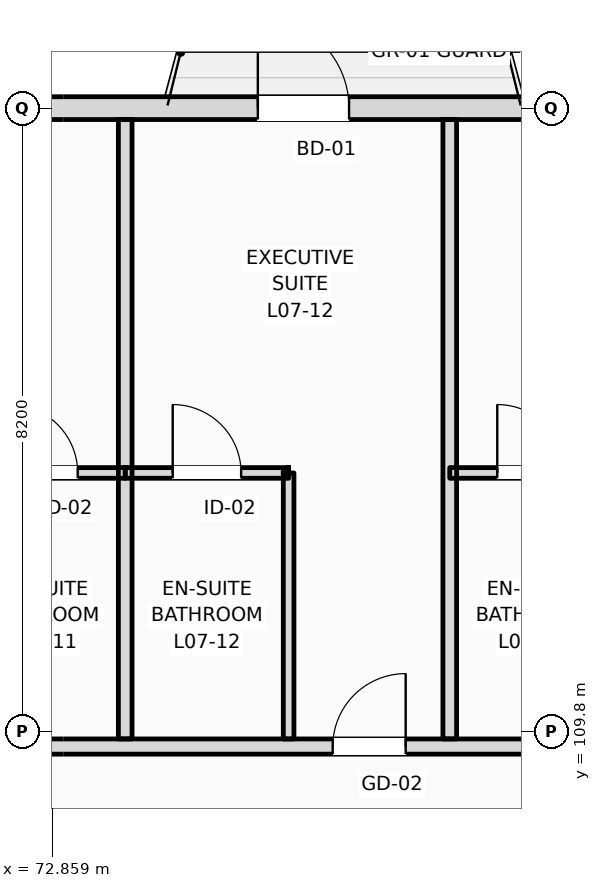
"""IFC4 building model, lengths in metres.
Left out: names, types, materials, properties, quantities, classifications, styles, units other than length and angle.
Written with IfcOpenShell. Run it as: python <this file> out.ifc"""

import sys

from ifc_helpers import new_model, si_unit, direction, frame, frame_2d, origin, place, context, subcontext, project, spatial, rectangle, extrude, element, fill, save


model = new_model("IFC4")
c1 = context("Model", 3, precision=1e-05, world=origin(), true_north=direction((0.0, 1.0)))
c2 = subcontext(c1, "Body", "Model", "MODEL_VIEW")
j1 = project(units=[si_unit("LENGTHUNIT", "METRE"), si_unit("PLANEANGLEUNIT", "RADIAN")], contexts=[c1])
p1 = place(None, origin())
s1 = spatial("IfcSite", under=j1, at=p1, CompositionType="ELEMENT")
p2 = place(p1, origin())
s2 = spatial("IfcBuilding", under=s1, at=p2, CompositionType="ELEMENT")
p3 = place(p2, frame((0.0, 0.0, 31.8)))
s3 = spatial("IfcBuildingStorey", under=s2, at=p3, CompositionType="ELEMENT", Elevation=31.8)
p4 = place(p3, frame((22.5, 118.0, 0.0), z_axis=(0.0, 0.0, 1.0), x_axis=(1.0, 0.0, 0.0)))
e1 = element("IfcWall", 1, at=p4, inside=s3, PredefinedType="STANDARD", context=c2, shape_type="SweptSolid", body=[
    extrude(rectangle(XDim=97.5, YDim=0.3, at=frame_2d((48.75, 0.0))), origin(), (0.0, 0.0, 1.0), 2.72),
])
p5 = place(p4, frame((3.61, 0.0, 0.9)))
e2 = element("IfcOpeningElement", 2, at=p5, cuts=e1, PredefinedType="OPENING", context=c2, shape_type="SweptSolid", body=[
    extrude(rectangle(XDim=1.1, YDim=1.64, at=frame_2d((0.55, 0.82))), frame((0.0, 0.16, 0.0), z_axis=(0.0, -1.0, 0.0), x_axis=(1.0, 0.0, 0.0)), (0.0, 0.0, 1.0), 0.32),
])
p6 = place(p4, frame((6.855, 0.0, 0.0)))
e3 = element("IfcOpeningElement", 3, at=p6, cuts=e1, PredefinedType="OPENING", context=c2, shape_type="SweptSolid", body=[
    extrude(rectangle(XDim=1.2, YDim=2.25, at=frame_2d((0.6, 1.125))), frame((0.0, 0.16, 0.0), z_axis=(0.0, -1.0, 0.0), x_axis=(1.0, 0.0, 0.0)), (0.0, 0.0, 1.0), 0.32),
])
p7 = place(p4, frame((11.405, 0.0, 0.9)))
e4 = element("IfcOpeningElement", 4, at=p7, cuts=e1, PredefinedType="OPENING", context=c2, shape_type="SweptSolid", body=[
    extrude(rectangle(XDim=2.1, YDim=1.64, at=frame_2d((1.05, 0.82))), frame((0.0, 0.16, 0.0), z_axis=(0.0, -1.0, 0.0), x_axis=(1.0, 0.0, 0.0)), (0.0, 0.0, 1.0), 0.32),
])
p8 = place(p4, frame((15.13, 0.0, 0.9)))
e5 = element("IfcOpeningElement", 5, at=p8, cuts=e1, PredefinedType="OPENING", context=c2, shape_type="SweptSolid", body=[
    extrude(rectangle(XDim=2.25, YDim=1.64, at=frame_2d((1.125, 0.82))), frame((0.0, 0.16, 0.0), z_axis=(0.0, -1.0, 0.0), x_axis=(1.0, 0.0, 0.0)), (0.0, 0.0, 1.0), 0.32),
])
p9 = place(p4, frame((21.53, 0.0, 0.0)))
e6 = element("IfcOpeningElement", 6, at=p9, cuts=e1, PredefinedType="OPENING", context=c2, shape_type="SweptSolid", body=[
    extrude(rectangle(XDim=1.2, YDim=2.25, at=frame_2d((0.6, 1.125))), frame((0.0, 0.16, 0.0), z_axis=(0.0, -1.0, 0.0), x_axis=(1.0, 0.0, 0.0)), (0.0, 0.0, 1.0), 0.32),
])
p10 = place(p4, frame((24.18, 0.0, 0.9)))
e7 = element("IfcOpeningElement", 7, at=p10, cuts=e1, PredefinedType="OPENING", context=c2, shape_type="SweptSolid", body=[
    extrude(rectangle(XDim=1.1, YDim=1.64, at=frame_2d((0.55, 0.82))), frame((0.0, 0.16, 0.0), z_axis=(0.0, -1.0, 0.0), x_axis=(1.0, 0.0, 0.0)), (0.0, 0.0, 1.0), 0.32),
])
p11 = place(p4, frame((29.105, 0.0, 0.9)))
e8 = element("IfcOpeningElement", 8, at=p11, cuts=e1, PredefinedType="OPENING", context=c2, shape_type="SweptSolid", body=[
    extrude(rectangle(XDim=2.7, YDim=1.64, at=frame_2d((1.35, 0.82))), frame((0.0, 0.16, 0.0), z_axis=(0.0, -1.0, 0.0), x_axis=(1.0, 0.0, 0.0)), (0.0, 0.0, 1.0), 0.32),
])
p12 = place(p4, frame((34.83, 0.0, 0.9)))
e9 = element("IfcOpeningElement", 9, at=p12, cuts=e1, PredefinedType="OPENING", context=c2, shape_type="SweptSolid", body=[
    extrude(rectangle(XDim=1.8, YDim=1.64, at=frame_2d((0.9, 0.82))), frame((0.0, 0.16, 0.0), z_axis=(0.0, -1.0, 0.0), x_axis=(1.0, 0.0, 0.0)), (0.0, 0.0, 1.0), 0.32),
])
p13 = place(p4, frame((38.525, 0.0, 0.0)))
e10 = element("IfcOpeningElement", 10, at=p13, cuts=e1, PredefinedType="OPENING", context=c2, shape_type="SweptSolid", body=[
    extrude(rectangle(XDim=1.2, YDim=2.25, at=frame_2d((0.6, 1.125))), frame((0.0, 0.16, 0.0), z_axis=(0.0, -1.0, 0.0), x_axis=(1.0, 0.0, 0.0)), (0.0, 0.0, 1.0), 0.32),
])
p14 = place(p4, frame((42.73, 0.0, 0.9)))
e11 = element("IfcOpeningElement", 11, at=p14, cuts=e1, PredefinedType="OPENING", context=c2, shape_type="SweptSolid", body=[
    extrude(rectangle(XDim=3.05, YDim=1.64, at=frame_2d((1.525, 0.82))), frame((0.0, 0.16, 0.0), z_axis=(0.0, -1.0, 0.0), x_axis=(1.0, 0.0, 0.0)), (0.0, 0.0, 1.0), 0.32),
])
p15 = place(p4, frame((47.155, 0.0, 0.9)))
e12 = element("IfcOpeningElement", 12, at=p15, cuts=e1, PredefinedType="OPENING", context=c2, shape_type="SweptSolid", body=[
    extrude(rectangle(XDim=1.35, YDim=1.64, at=frame_2d((0.675, 0.82))), frame((0.0, 0.16, 0.0), z_axis=(0.0, -1.0, 0.0), x_axis=(1.0, 0.0, 0.0)), (0.0, 0.0, 1.0), 0.32),
])
p16 = place(p4, frame((53.065, 0.0, 0.0)))
e13 = element("IfcOpeningElement", 13, at=p16, cuts=e1, PredefinedType="OPENING", context=c2, shape_type="SweptSolid", body=[
    extrude(rectangle(XDim=1.2, YDim=2.25, at=frame_2d((0.6, 1.125))), frame((0.0, 0.16, 0.0), z_axis=(0.0, -1.0, 0.0), x_axis=(1.0, 0.0, 0.0)), (0.0, 0.0, 1.0), 0.32),
])
p17 = place(p4, frame((58.2, 0.0, 0.9)))
e14 = element("IfcOpeningElement", 14, at=p17, cuts=e1, PredefinedType="OPENING", context=c2, shape_type="SweptSolid", body=[
    extrude(rectangle(XDim=1.8, YDim=1.64, at=frame_2d((0.9, 0.82))), frame((0.0, 0.16, 0.0), z_axis=(0.0, -1.0, 0.0), x_axis=(1.0, 0.0, 0.0)), (0.0, 0.0, 1.0), 0.32),
])
p18 = place(p4, frame((61.13, 0.0, 0.9)))
e15 = element("IfcOpeningElement", 15, at=p18, cuts=e1, PredefinedType="OPENING", context=c2, shape_type="SweptSolid", body=[
    extrude(rectangle(XDim=3.05, YDim=1.64, at=frame_2d((1.525, 0.82))), frame((0.0, 0.16, 0.0), z_axis=(0.0, -1.0, 0.0), x_axis=(1.0, 0.0, 0.0)), (0.0, 0.0, 1.0), 0.32),
])
p19 = place(p4, frame((67.93, 0.0, 0.0)))
e16 = element("IfcOpeningElement", 16, at=p19, cuts=e1, PredefinedType="OPENING", context=c2, shape_type="SweptSolid", body=[
    extrude(rectangle(XDim=1.2, YDim=2.25, at=frame_2d((0.6, 1.125))), frame((0.0, 0.16, 0.0), z_axis=(0.0, -1.0, 0.0), x_axis=(1.0, 0.0, 0.0)), (0.0, 0.0, 1.0), 0.32),
])
p20 = place(p4, frame((70.39, 0.0, 0.0)))
e17 = element("IfcOpeningElement", 17, at=p20, cuts=e1, PredefinedType="OPENING", context=c2, shape_type="SweptSolid", body=[
    extrude(rectangle(XDim=1.2, YDim=2.25, at=frame_2d((0.6, 1.125))), frame((0.0, 0.16, 0.0), z_axis=(0.0, -1.0, 0.0), x_axis=(1.0, 0.0, 0.0)), (0.0, 0.0, 1.0), 0.32),
])
p21 = place(p4, frame((75.905, 0.0, 0.9)))
e18 = element("IfcOpeningElement", 18, at=p21, cuts=e1, PredefinedType="OPENING", context=c2, shape_type="SweptSolid", body=[
    extrude(rectangle(XDim=1.1, YDim=1.5, at=frame_2d((0.55, 0.75))), frame((0.0, 0.16, 0.0), z_axis=(0.0, -1.0, 0.0), x_axis=(1.0, 0.0, 0.0)), (0.0, 0.0, 1.0), 0.32),
])
p22 = place(p4, frame((81.63, 0.0, 0.9)))
e19 = element("IfcOpeningElement", 19, at=p22, cuts=e1, PredefinedType="OPENING", context=c2, shape_type="SweptSolid", body=[
    extrude(rectangle(XDim=1.1, YDim=1.6, at=frame_2d((0.55, 0.8))), frame((0.0, 0.16, 0.0), z_axis=(0.0, -1.0, 0.0), x_axis=(1.0, 0.0, 0.0)), (0.0, 0.0, 1.0), 0.32),
])
p23 = place(p4, frame((84.955, 0.0, 0.9)))
e20 = element("IfcOpeningElement", 20, at=p23, cuts=e1, PredefinedType="OPENING", context=c2, shape_type="SweptSolid", body=[
    extrude(rectangle(XDim=1.4, YDim=1.64, at=frame_2d((0.7, 0.82))), frame((0.0, 0.16, 0.0), z_axis=(0.0, -1.0, 0.0), x_axis=(1.0, 0.0, 0.0)), (0.0, 0.0, 1.0), 0.32),
])
p24 = place(p4, frame((90.055, 0.0, 0.9)))
e21 = element("IfcOpeningElement", 21, at=p24, cuts=e1, PredefinedType="OPENING", context=c2, shape_type="SweptSolid", body=[
    extrude(rectangle(XDim=1.6, YDim=1.64, at=frame_2d((0.8, 0.82))), frame((0.0, 0.16, 0.0), z_axis=(0.0, -1.0, 0.0), x_axis=(1.0, 0.0, 0.0)), (0.0, 0.0, 1.0), 0.32),
])
p25 = place(p4, frame((93.87, 0.0, 0.9)))
e22 = element("IfcOpeningElement", 22, at=p25, cuts=e1, PredefinedType="OPENING", context=c2, shape_type="SweptSolid", body=[
    extrude(rectangle(XDim=1.75, YDim=1.64, at=frame_2d((0.875, 0.82))), frame((0.0, 0.16, 0.0), z_axis=(0.0, -1.0, 0.0), x_axis=(1.0, 0.0, 0.0)), (0.0, 0.0, 1.0), 0.32),
])
p26 = place(p3, frame((10.65, 109.6, 0.0), z_axis=(0.0, 0.0, 1.0), x_axis=(1.0, 0.0, 0.0)))
e23 = element("IfcWall", 23, at=p26, inside=s3, PredefinedType="PARTITIONING", context=c2, shape_type="SweptSolid", body=[
    extrude(rectangle(XDim=109.21, YDim=0.2, at=frame_2d((54.605, 0.0))), origin(), (0.0, 0.0, 1.0), 2.72),
])
p27 = place(p26, frame((15.825, 0.0, 0.0)))
e24 = element("IfcOpeningElement", 24, at=p27, cuts=e23, PredefinedType="OPENING", context=c2, shape_type="SweptSolid", body=[
    extrude(rectangle(XDim=1.02, YDim=2.2, at=frame_2d((0.51, 1.1))), frame((0.0, 0.11, 0.0), z_axis=(0.0, -1.0, 0.0), x_axis=(1.0, 0.0, 0.0)), (0.0, 0.0, 1.0), 0.22),
])
p28 = place(p26, frame((19.87, 0.0, 0.0)))
e25 = element("IfcOpeningElement", 25, at=p28, cuts=e23, PredefinedType="OPENING", context=c2, shape_type="SweptSolid", body=[
    extrude(rectangle(XDim=1.02, YDim=2.2, at=frame_2d((0.51, 1.1))), frame((0.0, 0.11, 0.0), z_axis=(0.0, -1.0, 0.0), x_axis=(1.0, 0.0, 0.0)), (0.0, 0.0, 1.0), 0.22),
])
p29 = place(p26, frame((24.47, 0.0, 0.0)))
e26 = element("IfcOpeningElement", 26, at=p29, cuts=e23, PredefinedType="OPENING", context=c2, shape_type="SweptSolid", body=[
    extrude(rectangle(XDim=1.02, YDim=2.2, at=frame_2d((0.51, 1.1))), frame((0.0, 0.11, 0.0), z_axis=(0.0, -1.0, 0.0), x_axis=(1.0, 0.0, 0.0)), (0.0, 0.0, 1.0), 0.22),
])
p30 = place(p26, frame((26.92, 0.0, 0.0)))
e27 = element("IfcOpeningElement", 27, at=p30, cuts=e23, PredefinedType="OPENING", context=c2, shape_type="SweptSolid", body=[
    extrude(rectangle(XDim=1.02, YDim=2.2, at=frame_2d((0.51, 1.1))), frame((0.0, 0.11, 0.0), z_axis=(0.0, -1.0, 0.0), x_axis=(1.0, 0.0, 0.0)), (0.0, 0.0, 1.0), 0.22),
])
p31 = place(p26, frame((33.7, 0.0, 0.0)))
e28 = element("IfcOpeningElement", 28, at=p31, cuts=e23, PredefinedType="OPENING", context=c2, shape_type="SweptSolid", body=[
    extrude(rectangle(XDim=0.96, YDim=2.2, at=frame_2d((0.48, 1.1))), frame((0.0, 0.11, 0.0), z_axis=(0.0, -1.0, 0.0), x_axis=(1.0, 0.0, 0.0)), (0.0, 0.0, 1.0), 0.22),
])
p32 = place(p26, frame((35.9, 0.0, 0.0)))
e29 = element("IfcOpeningElement", 29, at=p32, cuts=e23, PredefinedType="OPENING", context=c2, shape_type="SweptSolid", body=[
    extrude(rectangle(XDim=0.96, YDim=2.2, at=frame_2d((0.48, 1.1))), frame((0.0, 0.11, 0.0), z_axis=(0.0, -1.0, 0.0), x_axis=(1.0, 0.0, 0.0)), (0.0, 0.0, 1.0), 0.22),
])
p33 = place(p26, frame((42.9, 0.0, 0.0)))
e30 = element("IfcOpeningElement", 30, at=p33, cuts=e23, PredefinedType="OPENING", context=c2, shape_type="SweptSolid", body=[
    extrude(rectangle(XDim=0.96, YDim=2.2, at=frame_2d((0.48, 1.1))), frame((0.0, 0.11, 0.0), z_axis=(0.0, -1.0, 0.0), x_axis=(1.0, 0.0, 0.0)), (0.0, 0.0, 1.0), 0.22),
])
p34 = place(p26, frame((47.5, 0.0, 0.0)))
e31 = element("IfcOpeningElement", 31, at=p34, cuts=e23, PredefinedType="OPENING", context=c2, shape_type="SweptSolid", body=[
    extrude(rectangle(XDim=0.96, YDim=2.2, at=frame_2d((0.48, 1.1))), frame((0.0, 0.11, 0.0), z_axis=(0.0, -1.0, 0.0), x_axis=(1.0, 0.0, 0.0)), (0.0, 0.0, 1.0), 0.22),
])
p35 = place(p26, frame((49.95, 0.0, 0.0)))
e32 = element("IfcOpeningElement", 32, at=p35, cuts=e23, PredefinedType="OPENING", context=c2, shape_type="SweptSolid", body=[
    extrude(rectangle(XDim=0.96, YDim=2.2, at=frame_2d((0.48, 1.1))), frame((0.0, 0.11, 0.0), z_axis=(0.0, -1.0, 0.0), x_axis=(1.0, 0.0, 0.0)), (0.0, 0.0, 1.0), 0.22),
])
p36 = place(p26, frame((56.7, 0.0, 0.0)))
e33 = element("IfcOpeningElement", 33, at=p36, cuts=e23, PredefinedType="OPENING", context=c2, shape_type="SweptSolid", body=[
    extrude(rectangle(XDim=0.96, YDim=2.2, at=frame_2d((0.48, 1.1))), frame((0.0, 0.11, 0.0), z_axis=(0.0, -1.0, 0.0), x_axis=(1.0, 0.0, 0.0)), (0.0, 0.0, 1.0), 0.22),
])
p37 = place(p26, frame((59.15, 0.0, 0.0)))
e34 = element("IfcOpeningElement", 34, at=p37, cuts=e23, PredefinedType="OPENING", context=c2, shape_type="SweptSolid", body=[
    extrude(rectangle(XDim=0.96, YDim=2.2, at=frame_2d((0.48, 1.1))), frame((0.0, 0.11, 0.0), z_axis=(0.0, -1.0, 0.0), x_axis=(1.0, 0.0, 0.0)), (0.0, 0.0, 1.0), 0.22),
])
p38 = place(p26, frame((65.9, 0.0, 0.0)))
e35 = element("IfcOpeningElement", 35, at=p38, cuts=e23, PredefinedType="OPENING", context=c2, shape_type="SweptSolid", body=[
    extrude(rectangle(XDim=0.96, YDim=2.2, at=frame_2d((0.48, 1.1))), frame((0.0, 0.11, 0.0), z_axis=(0.0, -1.0, 0.0), x_axis=(1.0, 0.0, 0.0)), (0.0, 0.0, 1.0), 0.22),
])
p39 = place(p26, frame((70.5, 0.0, 0.0)))
e36 = element("IfcOpeningElement", 36, at=p39, cuts=e23, PredefinedType="OPENING", context=c2, shape_type="SweptSolid", body=[
    extrude(rectangle(XDim=0.96, YDim=2.2, at=frame_2d((0.48, 1.1))), frame((0.0, 0.11, 0.0), z_axis=(0.0, -1.0, 0.0), x_axis=(1.0, 0.0, 0.0)), (0.0, 0.0, 1.0), 0.22),
])
p40 = place(p26, frame((72.95, 0.0, 0.0)))
e37 = element("IfcOpeningElement", 37, at=p40, cuts=e23, PredefinedType="OPENING", context=c2, shape_type="SweptSolid", body=[
    extrude(rectangle(XDim=0.96, YDim=2.2, at=frame_2d((0.48, 1.1))), frame((0.0, 0.11, 0.0), z_axis=(0.0, -1.0, 0.0), x_axis=(1.0, 0.0, 0.0)), (0.0, 0.0, 1.0), 0.22),
])
p41 = place(p26, frame((79.7, 0.0, 0.0)))
e38 = element("IfcOpeningElement", 38, at=p41, cuts=e23, PredefinedType="OPENING", context=c2, shape_type="SweptSolid", body=[
    extrude(rectangle(XDim=0.96, YDim=2.2, at=frame_2d((0.48, 1.1))), frame((0.0, 0.11, 0.0), z_axis=(0.0, -1.0, 0.0), x_axis=(1.0, 0.0, 0.0)), (0.0, 0.0, 1.0), 0.22),
])
p42 = place(p26, frame((82.15, 0.0, 0.0)))
e39 = element("IfcOpeningElement", 39, at=p42, cuts=e23, PredefinedType="OPENING", context=c2, shape_type="SweptSolid", body=[
    extrude(rectangle(XDim=0.96, YDim=2.2, at=frame_2d((0.48, 1.1))), frame((0.0, 0.11, 0.0), z_axis=(0.0, -1.0, 0.0), x_axis=(1.0, 0.0, 0.0)), (0.0, 0.0, 1.0), 0.22),
])
p43 = place(p26, frame((88.9, 0.0, 0.0)))
e40 = element("IfcOpeningElement", 40, at=p43, cuts=e23, PredefinedType="OPENING", context=c2, shape_type="SweptSolid", body=[
    extrude(rectangle(XDim=0.96, YDim=2.2, at=frame_2d((0.48, 1.1))), frame((0.0, 0.11, 0.0), z_axis=(0.0, -1.0, 0.0), x_axis=(1.0, 0.0, 0.0)), (0.0, 0.0, 1.0), 0.22),
])
p44 = place(p26, frame((93.75, 0.0, 0.0)))
e41 = element("IfcOpeningElement", 41, at=p44, cuts=e23, PredefinedType="OPENING", context=c2, shape_type="SweptSolid", body=[
    extrude(rectangle(XDim=0.96, YDim=2.2, at=frame_2d((0.48, 1.1))), frame((0.0, 0.11, 0.0), z_axis=(0.0, -1.0, 0.0), x_axis=(1.0, 0.0, 0.0)), (0.0, 0.0, 1.0), 0.22),
])
p45 = place(p26, frame((98.1, 0.0, 0.0)))
e42 = element("IfcOpeningElement", 42, at=p45, cuts=e23, PredefinedType="OPENING", context=c2, shape_type="SweptSolid", body=[
    extrude(rectangle(XDim=0.96, YDim=2.2, at=frame_2d((0.48, 1.1))), frame((0.0, 0.11, 0.0), z_axis=(0.0, -1.0, 0.0), x_axis=(1.0, 0.0, 0.0)), (0.0, 0.0, 1.0), 0.22),
])
p46 = place(p26, frame((102.7, 0.0, 0.0)))
e43 = element("IfcOpeningElement", 43, at=p46, cuts=e23, PredefinedType="OPENING", context=c2, shape_type="SweptSolid", body=[
    extrude(rectangle(XDim=0.96, YDim=2.2, at=frame_2d((0.48, 1.1))), frame((0.0, 0.11, 0.0), z_axis=(0.0, -1.0, 0.0), x_axis=(1.0, 0.0, 0.0)), (0.0, 0.0, 1.0), 0.22),
])
p47 = place(p26, frame((105.04, 0.0, 0.0)))
e44 = element("IfcOpeningElement", 44, at=p47, cuts=e23, PredefinedType="OPENING", context=c2, shape_type="SweptSolid", body=[
    extrude(rectangle(XDim=0.96, YDim=2.2, at=frame_2d((0.48, 1.1))), frame((0.0, 0.11, 0.0), z_axis=(0.0, -1.0, 0.0), x_axis=(1.0, 0.0, 0.0)), (0.0, 0.0, 1.0), 0.22),
])
p48 = place(p26, frame((2.716, 0.0, 0.0)))
e45 = element("IfcOpeningElement", 45, at=p48, cuts=e23, PredefinedType="OPENING", context=c2, shape_type="SweptSolid", body=[
    extrude(rectangle(XDim=1.35, YDim=2.25, at=frame_2d((0.675, 1.125))), frame((0.0, 0.11, 0.0), z_axis=(0.0, -1.0, 0.0), x_axis=(1.0, 0.0, 0.0)), (0.0, 0.0, 1.0), 0.22),
])
p49 = place(p26, frame((6.65, 0.0, 0.0)))
e46 = element("IfcOpeningElement", 46, at=p49, cuts=e23, PredefinedType="OPENING", context=c2, shape_type="SweptSolid", body=[
    extrude(rectangle(XDim=1.35, YDim=2.25, at=frame_2d((0.675, 1.125))), frame((0.0, 0.11, 0.0), z_axis=(0.0, -1.0, 0.0), x_axis=(1.0, 0.0, 0.0)), (0.0, 0.0, 1.0), 0.22),
])
p50 = place(p26, frame((10.583, 0.0, 0.0)))
e47 = element("IfcOpeningElement", 47, at=p50, cuts=e23, PredefinedType="OPENING", context=c2, shape_type="SweptSolid", body=[
    extrude(rectangle(XDim=1.35, YDim=2.25, at=frame_2d((0.675, 1.125))), frame((0.0, 0.11, 0.0), z_axis=(0.0, -1.0, 0.0), x_axis=(1.0, 0.0, 0.0)), (0.0, 0.0, 1.0), 0.22),
])
p51 = place(p3, frame((73.82, 109.7, 0.0), z_axis=(0.0, 0.0, 1.0), x_axis=(0.0, 1.0, 0.0)))
e48 = element("IfcWall", 48, at=p51, inside=s3, PredefinedType="PARTITIONING", context=c2, shape_type="SweptSolid", body=[
    extrude(rectangle(XDim=8.15, YDim=0.18, at=frame_2d((4.075, 0.0))), origin(), (0.0, 0.0, 1.0), 3.36),
])
p52 = place(p3, frame((71.67, 113.2, 0.0), z_axis=(0.0, 0.0, 1.0), x_axis=(1.0, 0.0, 0.0)))
e49 = element("IfcWall", 49, at=p52, inside=s3, PredefinedType="PARTITIONING", context=c2, shape_type="SweptSolid", body=[
    extrude(rectangle(XDim=2.15, YDim=0.14, at=frame_2d((1.075, 0.0))), origin(), (0.0, 0.0, 1.0), 3.36),
])
p53 = place(p52, frame((0.625, 0.0, 0.0)))
e50 = element("IfcOpeningElement", 50, at=p53, cuts=e49, PredefinedType="OPENING", context=c2, shape_type="SweptSolid", body=[
    extrude(rectangle(XDim=0.9, YDim=2.1, at=frame_2d((0.45, 1.05))), frame((0.0, 0.08, 0.0), z_axis=(0.0, -1.0, 0.0), x_axis=(1.0, 0.0, 0.0)), (0.0, 0.0, 1.0), 0.16),
])
p54 = place(p3, frame((78.09, 109.7, 0.0), z_axis=(0.0, 0.0, 1.0), x_axis=(0.0, 1.0, 0.0)))
e51 = element("IfcWall", 51, at=p54, inside=s3, PredefinedType="PARTITIONING", context=c2, shape_type="SweptSolid", body=[
    extrude(rectangle(XDim=8.15, YDim=0.18, at=frame_2d((4.075, 0.0))), origin(), (0.0, 0.0, 1.0), 3.36),
])
p55 = place(p3, frame((75.97, 109.7, 0.0), z_axis=(0.0, 0.0, 1.0), x_axis=(0.0, 1.0, 0.0)))
e52 = element("IfcWall", 52, at=p55, inside=s3, PredefinedType="PARTITIONING", context=c2, shape_type="SweptSolid", body=[
    extrude(rectangle(XDim=3.5, YDim=0.14, at=frame_2d((1.75, 0.0))), origin(), (0.0, 0.0, 1.0), 3.36),
])
p56 = place(p3, frame((73.82, 113.2, 0.0), z_axis=(0.0, 0.0, 1.0), x_axis=(1.0, 0.0, 0.0)))
e53 = element("IfcWall", 53, at=p56, inside=s3, PredefinedType="PARTITIONING", context=c2, shape_type="SweptSolid", body=[
    extrude(rectangle(XDim=2.15, YDim=0.14, at=frame_2d((1.075, 0.0))), origin(), (0.0, 0.0, 1.0), 3.36),
])
p57 = place(p56, frame((0.625, 0.0, 0.0)))
e54 = element("IfcOpeningElement", 54, at=p57, cuts=e53, PredefinedType="OPENING", context=c2, shape_type="SweptSolid", body=[
    extrude(rectangle(XDim=0.9, YDim=2.1, at=frame_2d((0.45, 1.05))), frame((0.0, 0.08, 0.0), z_axis=(0.0, -1.0, 0.0), x_axis=(1.0, 0.0, 0.0)), (0.0, 0.0, 1.0), 0.16),
])
p58 = place(p3, frame((78.09, 113.2, 0.0), z_axis=(0.0, 0.0, 1.0), x_axis=(1.0, 0.0, 0.0)))
e55 = element("IfcWall", 55, at=p58, inside=s3, PredefinedType="PARTITIONING", context=c2, shape_type="SweptSolid", body=[
    extrude(rectangle(XDim=2.15, YDim=0.14, at=frame_2d((1.075, 0.0))), origin(), (0.0, 0.0, 1.0), 3.36),
])
p59 = place(p58, frame((0.625, 0.0, 0.0)))
e56 = element("IfcOpeningElement", 56, at=p59, cuts=e55, PredefinedType="OPENING", context=c2, shape_type="SweptSolid", body=[
    extrude(rectangle(XDim=0.9, YDim=2.1, at=frame_2d((0.45, 1.05))), frame((0.0, 0.08, 0.0), z_axis=(0.0, -1.0, 0.0), x_axis=(1.0, 0.0, 0.0)), (0.0, 0.0, 1.0), 0.16),
])
p60 = place(p16, origin())
e57 = element("IfcDoor", 57, at=p60, inside=s3, OperationType="SINGLE_SWING_LEFT", PredefinedType="DOOR", context=c2, shape_type="SweptSolid", body=[
    extrude(rectangle(XDim=1.2, YDim=2.25, at=frame_2d((0.6, 1.125))), frame((0.0, 0.025, 0.0), z_axis=(0.0, -1.0, 0.0), x_axis=(1.0, 0.0, 0.0)), (0.0, 0.0, 1.0), 0.05),
])
fill(e13, e57)
p61 = place(p53, origin())
e58 = element("IfcDoor", 58, at=p61, inside=s3, OperationType="SINGLE_SWING_LEFT", PredefinedType="DOOR", context=c2, shape_type="SweptSolid", body=[
    extrude(rectangle(XDim=0.9, YDim=2.1, at=frame_2d((0.45, 1.05))), frame((0.0, 0.025, 0.0), z_axis=(0.0, -1.0, 0.0), x_axis=(1.0, 0.0, 0.0)), (0.0, 0.0, 1.0), 0.05),
])
fill(e50, e58)
p62 = place(p38, origin())
e59 = element("IfcDoor", 59, at=p62, inside=s3, OperationType="SINGLE_SWING_RIGHT", PredefinedType="DOOR", context=c2, shape_type="SweptSolid", body=[
    extrude(rectangle(XDim=0.96, YDim=2.2, at=frame_2d((0.48, 1.1))), frame((0.0, 0.025, 0.0), z_axis=(0.0, -1.0, 0.0), x_axis=(1.0, 0.0, 0.0)), (0.0, 0.0, 1.0), 0.05),
])
fill(e35, e59)
p63 = place(p57, origin())
e60 = element("IfcDoor", 60, at=p63, inside=s3, OperationType="SINGLE_SWING_LEFT", PredefinedType="DOOR", context=c2, shape_type="SweptSolid", body=[
    extrude(rectangle(XDim=0.9, YDim=2.1, at=frame_2d((0.45, 1.05))), frame((0.0, 0.025, 0.0), z_axis=(0.0, -1.0, 0.0), x_axis=(1.0, 0.0, 0.0)), (0.0, 0.0, 1.0), 0.05),
])
fill(e54, e60)
p64 = place(p59, origin())
e61 = element("IfcDoor", 61, at=p64, inside=s3, OperationType="SINGLE_SWING_LEFT", PredefinedType="DOOR", context=c2, shape_type="SweptSolid", body=[
    extrude(rectangle(XDim=0.9, YDim=2.1, at=frame_2d((0.45, 1.05))), frame((0.0, 0.025, 0.0), z_axis=(0.0, -1.0, 0.0), x_axis=(1.0, 0.0, 0.0)), (0.0, 0.0, 1.0), 0.05),
])
fill(e56, e61)
save(model, sys.argv[1])
